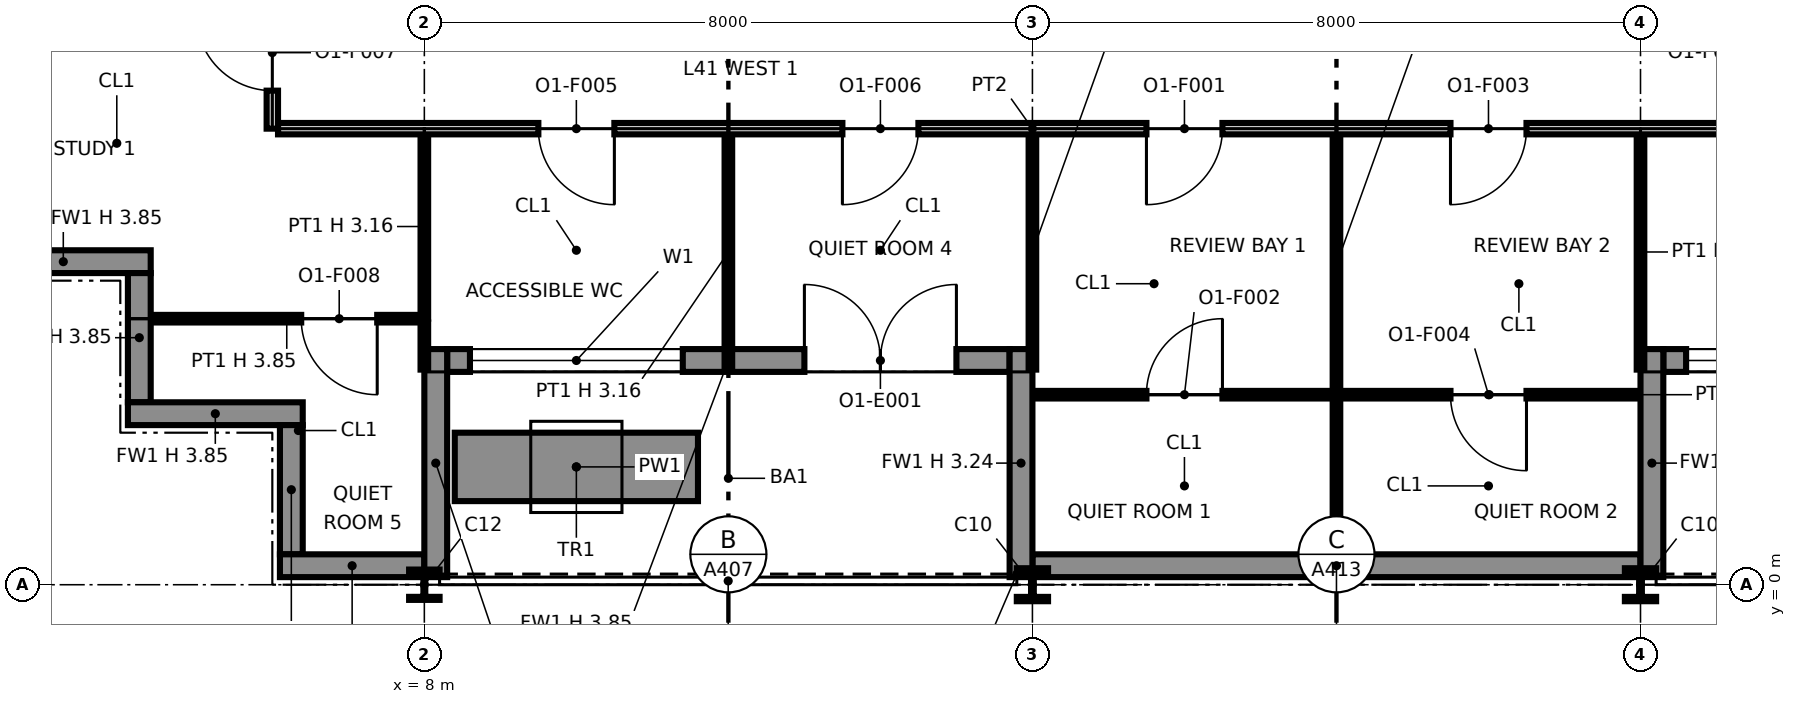
"""IFC4 building model, lengths in metres.
Left out: names, types, materials, properties, quantities, classifications, styles, units other than length and angle.
Written with IfcOpenShell. Run it as: python <this file> out.ifc"""

import sys

from ifc_helpers import new_model, si_unit, direction, frame, frame_2d, origin, origin_2d, place, context, subcontext, project, spatial, polyline, rectangle, i_section, outline, extrude, element, fill, save


model = new_model("IFC4")
c1 = context("Model", 3, precision=1e-05, world=origin(), true_north=direction((0.0, 1.0)))
c2 = subcontext(c1, "Body", "Model", "MODEL_VIEW")
j1 = project(units=[si_unit("LENGTHUNIT", "METRE"), si_unit("PLANEANGLEUNIT", "RADIAN")], contexts=[c1])
p1 = place(None, origin())
s1 = spatial("IfcSite", under=j1, at=p1, CompositionType="ELEMENT")
p2 = place(p1, origin())
s2 = spatial("IfcBuilding", under=s1, at=p2, CompositionType="ELEMENT")
p3 = place(p2, frame((0.0, 0.0, 197.0)))
s3 = spatial("IfcBuildingStorey", under=s2, at=p3, CompositionType="ELEMENT", Elevation=197.0)
p4 = place(p3, frame((8.0, 0.0, 0.0), z_axis=(0.0, 0.0, 1.0), x_axis=(1.0, 0.0, 0.0)))
e1 = element("IfcColumn", 1, at=p4, inside=s3, PredefinedType="COLUMN", context=c2, shape_type="SweptSolid", body=[
    extrude(i_section(OverallWidth=0.401, OverallDepth=0.399, WebThickness=0.025, FlangeThickness=0.04, at=origin_2d()), origin(), (0.0, 0.0, 1.0), 3.85),
])
for number, where, z_axis, x_axis in (
    (2, (16.0, 0.0, 0.0), (0.0, 0.0, 1.0), (1.0, 0.0, 0.0)),
    (3, (24.0, 0.0, 0.0), (0.0, 0.0, 1.0), (1.0, 0.0, 0.0)),
):
    element("IfcColumn", number, at=place(p3, frame(where, z_axis=z_axis, x_axis=x_axis)), inside=s3, PredefinedType="COLUMN", context=c2, shape_type="SweptSolid", body=[
        extrude(i_section(OverallWidth=0.411, OverallDepth=0.434, WebThickness=0.036, FlangeThickness=0.057, at=origin_2d()), origin(), (0.0, 0.0, 1.0), 3.85),
    ])
p5 = place(p3, frame((2.1, 4.25, 0.0), z_axis=(0.0, 0.0, 1.0), x_axis=(1.0, 0.0, 0.0)))
e4 = element("IfcWall", 4, at=p5, inside=s3, PredefinedType="SOLIDWALL", context=c2, shape_type="SweptSolid", body=[
    extrude(rectangle(XDim=2.3, YDim=0.3, at=frame_2d((1.15, 0.0))), origin(), (0.0, 0.0, 1.0), 3.85),
])
p6 = place(p3, frame((4.25, 4.1, 0.0), z_axis=(0.0, 0.0, 1.0), x_axis=(0.0, -1.0, 0.0)))
e5 = element("IfcWall", 5, at=p6, inside=s3, PredefinedType="SOLIDWALL", context=c2, shape_type="SweptSolid", body=[
    extrude(rectangle(XDim=1.7, YDim=0.3, at=frame_2d((0.85, 0.0))), origin(), (0.0, 0.0, 1.0), 3.85),
])
p7 = place(p3, frame((4.1, 2.25, 0.0), z_axis=(0.0, 0.0, 1.0), x_axis=(1.0, 0.0, 0.0)))
e6 = element("IfcWall", 6, at=p7, inside=s3, PredefinedType="SOLIDWALL", context=c2, shape_type="SweptSolid", body=[
    extrude(rectangle(XDim=2.3, YDim=0.3, at=frame_2d((1.15, 0.0))), origin(), (0.0, 0.0, 1.0), 3.85),
])
p8 = place(p3, frame((6.25, 2.1, 0.0), z_axis=(0.0, 0.0, 1.0), x_axis=(0.0, -1.0, 0.0)))
e7 = element("IfcWall", 7, at=p8, inside=s3, PredefinedType="SOLIDWALL", context=c2, shape_type="SweptSolid", body=[
    extrude(rectangle(XDim=1.7, YDim=0.3, at=frame_2d((0.85, 0.0))), origin(), (0.0, 0.0, 1.0), 3.85),
])
p9 = place(p3, frame((6.1, 0.25, 0.0), z_axis=(0.0, 0.0, 1.0), x_axis=(1.0, 0.0, 0.0)))
e8 = element("IfcWall", 8, at=p9, inside=s3, PredefinedType="SOLIDWALL", context=c2, shape_type="SweptSolid", body=[
    extrude(rectangle(XDim=1.9, YDim=0.3, at=frame_2d((0.95, 0.0))), origin(), (0.0, 0.0, 1.0), 3.85),
])
p10 = place(p3, frame((8.3, 2.95, 0.0), z_axis=(0.0, 0.0, 1.0), x_axis=(1.0, 0.0, 0.0)))
e9 = element("IfcWall", 9, at=p10, inside=s3, PredefinedType="SOLIDWALL", context=c2, shape_type="SweptSolid", body=[
    extrude(rectangle(XDim=7.4, YDim=0.3, at=frame_2d((3.7, 0.0))), origin(), (0.0, 0.0, 1.0), 3.85),
])
p11 = place(p10, frame((0.3, 0.0, 0.9)))
e10 = element("IfcOpeningElement", 10, at=p11, cuts=e9, PredefinedType="OPENING", context=c2, shape_type="SweptSolid", body=[
    extrude(rectangle(XDim=2.8, YDim=2.2, at=frame_2d((1.4, 1.1))), frame((0.0, 0.16, 0.0), z_axis=(0.0, -1.0, 0.0), x_axis=(1.0, 0.0, 0.0)), (0.0, 0.0, 1.0), 0.32),
])
p12 = place(p10, frame((4.7, 0.0, 0.0)))
e11 = element("IfcOpeningElement", 11, at=p12, cuts=e9, PredefinedType="OPENING", context=c2, shape_type="SweptSolid", body=[
    extrude(rectangle(XDim=2.0, YDim=2.4, at=frame_2d((1.0, 1.2))), frame((0.0, 0.16, 0.0), z_axis=(0.0, -1.0, 0.0), x_axis=(1.0, 0.0, 0.0)), (0.0, 0.0, 1.0), 0.32),
])
p13 = place(p3, frame((8.15, 0.1, 0.0), z_axis=(0.0, 0.0, 1.0), x_axis=(0.0, 1.0, 0.0)))
e12 = element("IfcWall", 12, at=p13, inside=s3, PredefinedType="SOLIDWALL", context=c2, shape_type="SweptSolid", body=[
    extrude(rectangle(XDim=3.0, YDim=0.3, at=frame_2d((1.5, 0.0))), origin(), (0.0, 0.0, 1.0), 3.156),
])
p14 = place(p3, frame((15.85, 0.1, 0.0), z_axis=(0.0, 0.0, 1.0), x_axis=(0.0, 1.0, 0.0)))
e13 = element("IfcWall", 13, at=p14, inside=s3, PredefinedType="SOLIDWALL", context=c2, shape_type="SweptSolid", body=[
    extrude(rectangle(XDim=3.0, YDim=0.3, at=frame_2d((1.5, 0.0))), origin(), (0.0, 0.0, 1.0), 3.237),
])
p15 = place(p3, frame((16.0, 0.25, 0.0), z_axis=(0.0, 0.0, 1.0), x_axis=(1.0, 0.0, 0.0)))
e14 = element("IfcWall", 14, at=p15, inside=s3, PredefinedType="SOLIDWALL", context=c2, shape_type="SweptSolid", body=[
    extrude(rectangle(XDim=8.0, YDim=0.3, at=frame_2d((4.0, 0.0))), origin(), (0.0, 0.0, 1.0), 3.85),
])
p16 = place(p3, frame((24.3, 2.95, 0.0), z_axis=(0.0, 0.0, 1.0), x_axis=(1.0, 0.0, 0.0)))
e15 = element("IfcWall", 15, at=p16, inside=s3, PredefinedType="SOLIDWALL", context=c2, shape_type="SweptSolid", body=[
    extrude(rectangle(XDim=7.4, YDim=0.3, at=frame_2d((3.7, 0.0))), origin(), (0.0, 0.0, 1.0), 3.85),
])
p17 = place(p16, frame((0.3, 0.0, 0.9)))
e16 = element("IfcOpeningElement", 16, at=p17, cuts=e15, PredefinedType="OPENING", context=c2, shape_type="SweptSolid", body=[
    extrude(rectangle(XDim=2.8, YDim=2.2, at=frame_2d((1.4, 1.1))), frame((0.0, 0.16, 0.0), z_axis=(0.0, -1.0, 0.0), x_axis=(1.0, 0.0, 0.0)), (0.0, 0.0, 1.0), 0.32),
])
p18 = place(p16, frame((4.7, 0.0, 0.0)))
e17 = element("IfcOpeningElement", 17, at=p18, cuts=e15, PredefinedType="OPENING", context=c2, shape_type="SweptSolid", body=[
    extrude(rectangle(XDim=2.0, YDim=2.4, at=frame_2d((1.0, 1.2))), frame((0.0, 0.16, 0.0), z_axis=(0.0, -1.0, 0.0), x_axis=(1.0, 0.0, 0.0)), (0.0, 0.0, 1.0), 0.32),
])
p19 = place(p3, frame((24.15, 0.1, 0.0), z_axis=(0.0, 0.0, 1.0), x_axis=(0.0, 1.0, 0.0)))
e18 = element("IfcWall", 18, at=p19, inside=s3, PredefinedType="SOLIDWALL", context=c2, shape_type="SweptSolid", body=[
    extrude(rectangle(XDim=3.0, YDim=0.3, at=frame_2d((1.5, 0.0))), origin(), (0.0, 0.0, 1.0), 3.237),
])
p20 = place(p3, frame((8.4, 1.55, 0.0), z_axis=(0.0, 0.0, 1.0), x_axis=(1.0, 0.0, 0.0)))
e19 = element("IfcWall", 19, at=p20, inside=s3, PredefinedType="SOLIDWALL", context=c2, shape_type="SweptSolid", body=[
    extrude(rectangle(XDim=3.2, YDim=0.9, at=frame_2d((1.6, 0.0))), origin(), (0.0, 0.0, 1.0), 0.6),
])
p21 = place(p3, frame((20.0, 0.13, 0.0), z_axis=(0.0, 0.0, 1.0), x_axis=(0.0, 1.0, 0.0)))
e20 = element("IfcWall", 20, at=p21, inside=s3, PredefinedType="PARTITIONING", context=c2, shape_type="SweptSolid", body=[
    extrude(rectangle(XDim=2.32, YDim=0.1, at=frame_2d((1.16, 0.0))), origin(), (0.0, 0.0, 1.0), 3.85),
])
p22 = place(p3, frame((16.03, 2.5, 0.0), z_axis=(0.0, 0.0, 1.0), x_axis=(1.0, 0.0, 0.0)))
e21 = element("IfcWall", 21, at=p22, inside=s3, PredefinedType="PARTITIONING", context=c2, shape_type="SweptSolid", body=[
    extrude(rectangle(XDim=3.92, YDim=0.1, at=frame_2d((1.96, 0.0))), origin(), (0.0, 0.0, 1.0), 3.85),
])
p23 = place(p22, frame((1.47, 0.0, 0.0)))
e22 = element("IfcOpeningElement", 22, at=p23, cuts=e21, PredefinedType="OPENING", context=c2, shape_type="SweptSolid", body=[
    extrude(rectangle(XDim=1.0, YDim=2.1, at=frame_2d((0.5, 1.05))), frame((0.0, 0.06, 0.0), z_axis=(0.0, -1.0, 0.0), x_axis=(1.0, 0.0, 0.0)), (0.0, 0.0, 1.0), 0.12),
])
p24 = place(p3, frame((20.05, 2.5, 0.0), z_axis=(0.0, 0.0, 1.0), x_axis=(1.0, 0.0, 0.0)))
e23 = element("IfcWall", 23, at=p24, inside=s3, PredefinedType="PARTITIONING", context=c2, shape_type="SweptSolid", body=[
    extrude(rectangle(XDim=3.92, YDim=0.1, at=frame_2d((1.96, 0.0))), origin(), (0.0, 0.0, 1.0), 3.85),
])
p25 = place(p24, frame((2.45, 0.0, 0.0), z_axis=(0.0, 0.0, 1.0), x_axis=(-1.0, 0.0, 0.0)))
e24 = element("IfcOpeningElement", 24, at=p25, cuts=e23, PredefinedType="OPENING", context=c2, shape_type="SweptSolid", body=[
    extrude(rectangle(XDim=1.0, YDim=2.1, at=frame_2d((0.5, 1.05))), frame((0.0, 0.06, 0.0), z_axis=(0.0, -1.0, 0.0), x_axis=(1.0, 0.0, 0.0)), (0.0, 0.0, 1.0), 0.12),
])
p26 = place(p3, frame((20.0, 2.5, 0.0), z_axis=(0.0, 0.0, 1.0), x_axis=(0.0, 1.0, 0.0)))
e25 = element("IfcWall", 25, at=p26, inside=s3, PredefinedType="PARTITIONING", context=c2, shape_type="SweptSolid", body=[
    extrude(rectangle(XDim=3.425, YDim=0.1, at=frame_2d((1.712, 0.0))), origin(), (0.0, 0.0, 1.0), 3.157),
])
p27 = place(p3, frame((8.0, 2.83, 0.0), z_axis=(0.0, 0.0, 1.0), x_axis=(0.0, 1.0, 0.0)))
e26 = element("IfcWall", 26, at=p27, inside=s3, PredefinedType="PARTITIONING", context=c2, shape_type="SweptSolid", body=[
    extrude(rectangle(XDim=0.62, YDim=0.1, at=frame_2d((0.31, 0.0))), origin(), (0.0, 0.0, 1.0), 3.157),
])
for number, where, z_axis, x_axis in (
    (27, (12.0, 2.83, 0.0), (0.0, 0.0, 1.0), (0.0, 1.0, 0.0)),
    (28, (16.0, 2.83, 0.0), (0.0, 0.0, 1.0), (0.0, 1.0, 0.0)),
    (29, (24.0, 2.83, 0.0), (0.0, 0.0, 1.0), (0.0, 1.0, 0.0)),
):
    element("IfcWall", number, at=place(p3, frame(where, z_axis=z_axis, x_axis=x_axis)), inside=s3, PredefinedType="PARTITIONING", context=c2, shape_type="SweptSolid", body=[
        extrude(rectangle(XDim=3.095, YDim=0.1, at=frame_2d((1.547, 0.0))), origin(), (0.0, 0.0, 1.0), 3.157),
    ])
p28 = place(p3, frame((4.43, 3.5, 0.0), z_axis=(0.0, 0.0, 1.0), x_axis=(1.0, 0.0, 0.0)))
e30 = element("IfcWall", 30, at=p28, inside=s3, PredefinedType="PARTITIONING", context=c2, shape_type="SweptSolid", body=[
    extrude(rectangle(XDim=3.52, YDim=0.1, at=frame_2d((1.76, 0.0))), origin(), (0.0, 0.0, 1.0), 3.85),
])
p29 = place(p28, frame((2.95, 0.0, 0.0), z_axis=(0.0, 0.0, 1.0), x_axis=(-1.0, 0.0, 0.0)))
e31 = element("IfcOpeningElement", 31, at=p29, cuts=e30, PredefinedType="OPENING", context=c2, shape_type="SweptSolid", body=[
    extrude(rectangle(XDim=1.0, YDim=2.1, at=frame_2d((0.5, 1.05))), frame((0.0, 0.06, 0.0), z_axis=(0.0, -1.0, 0.0), x_axis=(1.0, 0.0, 0.0)), (0.0, 0.0, 1.0), 0.12),
])
p30 = place(p3, frame((8.0, 3.5, 0.0), z_axis=(0.0, 0.0, 1.0), x_axis=(0.0, 1.0, 0.0)))
e32 = element("IfcWall", 32, at=p30, inside=s3, PredefinedType="PARTITIONING", context=c2, shape_type="SweptSolid", body=[
    extrude(rectangle(XDim=2.425, YDim=0.1, at=frame_2d((1.212, 0.0))), origin(), (0.0, 0.0, 1.0), 3.157),
])
p31 = place(p3, frame((6.075, 6.0, 0.0), z_axis=(0.0, 0.0, 1.0), x_axis=(1.0, 0.0, 0.0)))
e33 = element("IfcWall", 33, at=p31, inside=s3, PredefinedType="PARTITIONING", context=c2, shape_type="SweptSolid", body=[
    extrude(rectangle(XDim=19.85, YDim=0.15, at=frame_2d((9.925, 0.0))), origin(), (0.0, 0.0, 1.0), 3.85),
])
p32 = place(p31, frame((12.425, 0.0, 0.0), z_axis=(0.0, 0.0, 1.0), x_axis=(-1.0, 0.0, 0.0)))
e34 = element("IfcOpeningElement", 34, at=p32, cuts=e33, PredefinedType="OPENING", context=c2, shape_type="SweptSolid", body=[
    extrude(rectangle(XDim=1.0, YDim=2.1, at=frame_2d((0.5, 1.05))), frame((0.0, 0.085, 0.0), z_axis=(0.0, -1.0, 0.0), x_axis=(1.0, 0.0, 0.0)), (0.0, 0.0, 1.0), 0.17),
])
p33 = place(p31, frame((16.425, 0.0, 0.0), z_axis=(0.0, 0.0, 1.0), x_axis=(-1.0, 0.0, 0.0)))
e35 = element("IfcOpeningElement", 35, at=p33, cuts=e33, PredefinedType="OPENING", context=c2, shape_type="SweptSolid", body=[
    extrude(rectangle(XDim=1.0, YDim=2.1, at=frame_2d((0.5, 1.05))), frame((0.0, 0.085, 0.0), z_axis=(0.0, -1.0, 0.0), x_axis=(1.0, 0.0, 0.0)), (0.0, 0.0, 1.0), 0.17),
])
p34 = place(p31, frame((4.425, 0.0, 0.0), z_axis=(0.0, 0.0, 1.0), x_axis=(-1.0, 0.0, 0.0)))
e36 = element("IfcOpeningElement", 36, at=p34, cuts=e33, PredefinedType="OPENING", context=c2, shape_type="SweptSolid", body=[
    extrude(rectangle(XDim=1.0, YDim=2.1, at=frame_2d((0.5, 1.05))), frame((0.0, 0.085, 0.0), z_axis=(0.0, -1.0, 0.0), x_axis=(1.0, 0.0, 0.0)), (0.0, 0.0, 1.0), 0.17),
])
p35 = place(p31, frame((8.425, 0.0, 0.0), z_axis=(0.0, 0.0, 1.0), x_axis=(-1.0, 0.0, 0.0)))
e37 = element("IfcOpeningElement", 37, at=p35, cuts=e33, PredefinedType="OPENING", context=c2, shape_type="SweptSolid", body=[
    extrude(rectangle(XDim=1.0, YDim=2.1, at=frame_2d((0.5, 1.05))), frame((0.0, 0.085, 0.0), z_axis=(0.0, -1.0, 0.0), x_axis=(1.0, 0.0, 0.0)), (0.0, 0.0, 1.0), 0.17),
])
p36 = place(p3, frame((6.0, 6.0, 0.0), z_axis=(0.0, 0.0, 1.0), x_axis=(0.0, 1.0, 0.0)))
e38 = element("IfcWall", 38, at=p36, inside=s3, PredefinedType="PARTITIONING", context=c2, shape_type="SweptSolid", body=[
    extrude(outline(polyline([(0.0, 0.0), (15.87, 0.0), (15.87, 3.85), (14.3, 3.85), (14.298, 3.157), (13.702, 3.157), (13.7, 3.85), (10.3, 3.85), (10.298, 3.157), (9.702, 3.157), (9.7, 3.85), (6.3, 3.85), (6.298, 3.157), (5.702, 3.157), (5.7, 3.85), (2.3, 3.85), (2.298, 3.157), (1.702, 3.157), (1.7, 3.85), (0.0, 3.85), (0.0, 0.0)])), frame((0.0, 0.075, 0.0), z_axis=(0.0, -1.0, 0.0), x_axis=(1.0, 0.0, 0.0)), (0.0, 0.0, 1.0), 0.15),
])
p37 = place(p36, frame((0.5, 0.0, 0.0)))
e39 = element("IfcOpeningElement", 39, at=p37, cuts=e38, PredefinedType="OPENING", context=c2, shape_type="SweptSolid", body=[
    extrude(rectangle(XDim=1.0, YDim=2.1, at=frame_2d((0.5, 1.05))), frame((0.0, 0.085, 0.0), z_axis=(0.0, -1.0, 0.0), x_axis=(1.0, 0.0, 0.0)), (0.0, 0.0, 1.0), 0.17),
])
p38 = place(p36, frame((3.5, 0.0, 0.0)))
e40 = element("IfcOpeningElement", 40, at=p38, cuts=e38, PredefinedType="OPENING", context=c2, shape_type="SweptSolid", body=[
    extrude(rectangle(XDim=1.0, YDim=2.1, at=frame_2d((0.5, 1.05))), frame((0.0, 0.085, 0.0), z_axis=(0.0, -1.0, 0.0), x_axis=(1.0, 0.0, 0.0)), (0.0, 0.0, 1.0), 0.17),
])
p39 = place(p36, frame((7.5, 0.0, 0.0)))
e41 = element("IfcOpeningElement", 41, at=p39, cuts=e38, PredefinedType="OPENING", context=c2, shape_type="SweptSolid", body=[
    extrude(rectangle(XDim=1.0, YDim=2.1, at=frame_2d((0.5, 1.05))), frame((0.0, 0.085, 0.0), z_axis=(0.0, -1.0, 0.0), x_axis=(1.0, 0.0, 0.0)), (0.0, 0.0, 1.0), 0.17),
])
p40 = place(p36, frame((11.225, 0.0, 0.0)))
e42 = element("IfcOpeningElement", 42, at=p40, cuts=e38, PredefinedType="OPENING", context=c2, shape_type="SweptSolid", body=[
    extrude(rectangle(XDim=1.0, YDim=2.1, at=frame_2d((0.5, 1.05))), frame((0.0, 0.085, 0.0), z_axis=(0.0, -1.0, 0.0), x_axis=(1.0, 0.0, 0.0)), (0.0, 0.0, 1.0), 0.17),
])
p41 = place(p11, origin())
e43 = element("IfcWindow", 43, at=p41, inside=s3, PartitioningType="SINGLE_PANEL", PredefinedType="WINDOW", context=c2, shape_type="SweptSolid", body=[
    extrude(rectangle(XDim=2.8, YDim=2.2, at=frame_2d((1.4, 1.1))), frame((0.0, 0.03, 0.0), z_axis=(0.0, -1.0, 0.0), x_axis=(1.0, 0.0, 0.0)), (0.0, 0.0, 1.0), 0.06),
])
fill(e10, e43)
p42 = place(p12, origin())
e44 = element("IfcDoor", 44, at=p42, inside=s3, OperationType="DOUBLE_DOOR_SINGLE_SWING", PredefinedType="DOOR", context=c2, shape_type="SweptSolid", body=[
    extrude(rectangle(XDim=2.0, YDim=2.4, at=frame_2d((1.0, 1.2))), frame((0.0, 0.025, 0.0), z_axis=(0.0, -1.0, 0.0), x_axis=(1.0, 0.0, 0.0)), (0.0, 0.0, 1.0), 0.05),
])
fill(e11, e44)
p43 = place(p17, origin())
e45 = element("IfcWindow", 45, at=p43, inside=s3, PartitioningType="SINGLE_PANEL", PredefinedType="WINDOW", context=c2, shape_type="SweptSolid", body=[
    extrude(rectangle(XDim=2.8, YDim=2.2, at=frame_2d((1.4, 1.1))), frame((0.0, 0.03, 0.0), z_axis=(0.0, -1.0, 0.0), x_axis=(1.0, 0.0, 0.0)), (0.0, 0.0, 1.0), 0.06),
])
fill(e16, e45)
p44 = place(p32, origin())
e46 = element("IfcDoor", 46, at=p44, inside=s3, OperationType="SINGLE_SWING_RIGHT", PredefinedType="DOOR", context=c2, shape_type="SweptSolid", body=[
    extrude(rectangle(XDim=1.0, YDim=2.1, at=frame_2d((0.5, 1.05))), frame((0.0, 0.025, 0.0), z_axis=(0.0, -1.0, 0.0), x_axis=(1.0, 0.0, 0.0)), (0.0, 0.0, 1.0), 0.05),
])
fill(e34, e46)
p45 = place(p23, origin())
e47 = element("IfcDoor", 47, at=p45, inside=s3, OperationType="SINGLE_SWING_RIGHT", PredefinedType="DOOR", context=c2, shape_type="SweptSolid", body=[
    extrude(rectangle(XDim=1.0, YDim=2.1, at=frame_2d((0.5, 1.05))), frame((0.0, 0.025, 0.0), z_axis=(0.0, -1.0, 0.0), x_axis=(1.0, 0.0, 0.0)), (0.0, 0.0, 1.0), 0.05),
])
fill(e22, e47)
p46 = place(p33, origin())
e48 = element("IfcDoor", 48, at=p46, inside=s3, OperationType="SINGLE_SWING_RIGHT", PredefinedType="DOOR", context=c2, shape_type="SweptSolid", body=[
    extrude(rectangle(XDim=1.0, YDim=2.1, at=frame_2d((0.5, 1.05))), frame((0.0, 0.025, 0.0), z_axis=(0.0, -1.0, 0.0), x_axis=(1.0, 0.0, 0.0)), (0.0, 0.0, 1.0), 0.05),
])
fill(e35, e48)
p47 = place(p25, origin())
e49 = element("IfcDoor", 49, at=p47, inside=s3, OperationType="SINGLE_SWING_LEFT", PredefinedType="DOOR", context=c2, shape_type="SweptSolid", body=[
    extrude(rectangle(XDim=1.0, YDim=2.1, at=frame_2d((0.5, 1.05))), frame((0.0, 0.025, 0.0), z_axis=(0.0, -1.0, 0.0), x_axis=(1.0, 0.0, 0.0)), (0.0, 0.0, 1.0), 0.05),
])
fill(e24, e49)
p48 = place(p34, origin())
e50 = element("IfcDoor", 50, at=p48, inside=s3, OperationType="SINGLE_SWING_LEFT", PredefinedType="DOOR", context=c2, shape_type="SweptSolid", body=[
    extrude(rectangle(XDim=1.0, YDim=2.1, at=frame_2d((0.5, 1.05))), frame((0.0, 0.025, 0.0), z_axis=(0.0, -1.0, 0.0), x_axis=(1.0, 0.0, 0.0)), (0.0, 0.0, 1.0), 0.05),
])
fill(e36, e50)
p49 = place(p35, origin())
e51 = element("IfcDoor", 51, at=p49, inside=s3, OperationType="SINGLE_SWING_RIGHT", PredefinedType="DOOR", context=c2, shape_type="SweptSolid", body=[
    extrude(rectangle(XDim=1.0, YDim=2.1, at=frame_2d((0.5, 1.05))), frame((0.0, 0.025, 0.0), z_axis=(0.0, -1.0, 0.0), x_axis=(1.0, 0.0, 0.0)), (0.0, 0.0, 1.0), 0.05),
])
fill(e37, e51)
p50 = place(p37, origin())
e52 = element("IfcDoor", 52, at=p50, inside=s3, OperationType="SINGLE_SWING_RIGHT", PredefinedType="DOOR", context=c2, shape_type="SweptSolid", body=[
    extrude(rectangle(XDim=1.0, YDim=2.1, at=frame_2d((0.5, 1.05))), frame((0.0, 0.025, 0.0), z_axis=(0.0, -1.0, 0.0), x_axis=(1.0, 0.0, 0.0)), (0.0, 0.0, 1.0), 0.05),
])
fill(e39, e52)
p51 = place(p29, origin())
e53 = element("IfcDoor", 53, at=p51, inside=s3, OperationType="SINGLE_SWING_LEFT", PredefinedType="DOOR", context=c2, shape_type="SweptSolid", body=[
    extrude(rectangle(XDim=1.0, YDim=2.1, at=frame_2d((0.5, 1.05))), frame((0.0, 0.025, 0.0), z_axis=(0.0, -1.0, 0.0), x_axis=(1.0, 0.0, 0.0)), (0.0, 0.0, 1.0), 0.05),
])
fill(e31, e53)
save(model, sys.argv[1])
